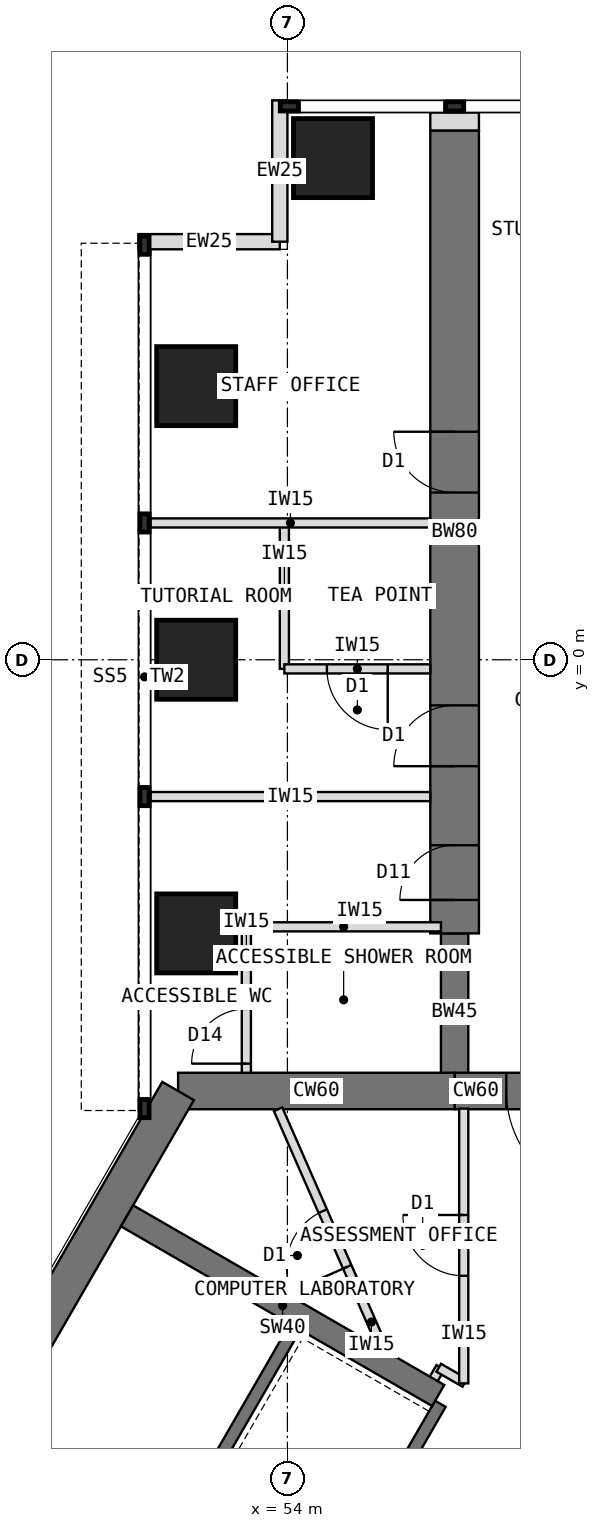
"""IFC4 building model, lengths in metres.
Left out: names, types, materials, properties, quantities, classifications, styles, units other than length and angle.
Written with IfcOpenShell. Run it as: python <this file> out.ifc"""

import sys

from ifc_helpers import new_model, si_unit, direction, frame, frame_2d, origin, origin_2d, place, context, subcontext, project, spatial, rectangle, extrude, element, fill, save


model = new_model("IFC4")
c1 = context("Model", 3, precision=1e-05, world=origin(), true_north=direction((0.0, 1.0)))
c2 = subcontext(c1, "Body", "Model", "MODEL_VIEW")
j1 = project(units=[si_unit("LENGTHUNIT", "METRE"), si_unit("PLANEANGLEUNIT", "RADIAN")], contexts=[c1])
p1 = place(None, origin())
s1 = spatial("IfcSite", under=j1, at=p1, CompositionType="ELEMENT")
p2 = place(p1, origin())
s2 = spatial("IfcBuilding", under=s1, at=p2, CompositionType="ELEMENT")
p3 = place(p2, frame((0.0, 0.0, 125.5)))
s3 = spatial("IfcBuildingStorey", under=s2, at=p3, CompositionType="ELEMENT", Elevation=125.5)
p4 = place(p3, frame((60.25, -7.092, 0.0), z_axis=(0.0, 0.0, 1.0), x_axis=(-1.0, 0.0, 0.0)))
e1 = element("IfcWall", 1, at=p4, inside=s3, PredefinedType="SHEAR", context=c2, shape_type="SweptSolid", body=[
    extrude(rectangle(XDim=3.5, YDim=0.6, at=frame_2d((1.75, 0.0))), origin(), (0.0, 0.0, 1.0), 4.0),
])
p5 = place(p4, frame((0.85, 0.0, 0.0)))
e2 = element("IfcOpeningElement", 2, at=p5, cuts=e1, PredefinedType="OPENING", context=c2, shape_type="SweptSolid", body=[
    extrude(rectangle(XDim=1.8, YDim=2.1, at=frame_2d((0.9, 1.05))), frame((0.0, 0.31, 0.0), z_axis=(0.0, -1.0, 0.0), x_axis=(1.0, 0.0, 0.0)), (0.0, 0.0, 1.0), 0.62),
])
p6 = place(p3, frame((56.75, -7.092, 0.0), z_axis=(0.0, 0.0, 1.0), x_axis=(-1.0, 0.0, 0.0)))
e3 = element("IfcWall", 3, at=p6, inside=s3, PredefinedType="SHEAR", context=c2, shape_type="SweptSolid", body=[
    extrude(rectangle(XDim=4.548, YDim=0.6, at=frame_2d((2.274, 0.0))), origin(), (0.0, 0.0, 1.0), 4.0),
])
p7 = place(p3, frame((52.202, -7.092, 0.0), z_axis=(0.0, 0.0, 1.0), x_axis=(-0.500005998175, -0.866021940709, 0.0)))
e4 = element("IfcWall", 4, at=p7, inside=s3, PredefinedType="SHEAR", context=c2, shape_type="SweptSolid", body=[
    extrude(rectangle(XDim=12.596, YDim=0.6, at=frame_2d((6.298, 0.0))), origin(), (0.0, 0.0, 1.0), 4.0),
])
p8 = place(p3, frame((56.75, -7.092, 0.0), z_axis=(0.0, 0.0, 1.0), x_axis=(0.0, 1.0, 0.0)))
e5 = element("IfcWall", 5, at=p8, inside=s3, PredefinedType="SHEAR", context=c2, shape_type="SweptSolid", body=[
    extrude(rectangle(XDim=2.592, YDim=0.45, at=frame_2d((1.296, 0.0))), origin(), (0.0, 0.0, 1.0), 4.0),
])
p9 = place(p3, frame((56.75, -4.5, 0.0), z_axis=(0.0, 0.0, 1.0), x_axis=(0.0, 1.0, 0.0)))
e6 = element("IfcWall", 6, at=p9, inside=s3, PredefinedType="SHEAR", context=c2, shape_type="SweptSolid", body=[
    extrude(rectangle(XDim=13.2, YDim=0.8, at=frame_2d((6.6, 0.0))), origin(), (0.0, 0.0, 1.0), 4.0),
])
p10 = place(p9, frame((0.55, 0.0, 0.0)))
e7 = element("IfcOpeningElement", 7, at=p10, cuts=e6, PredefinedType="OPENING", context=c2, shape_type="SweptSolid", body=[
    extrude(rectangle(XDim=0.9, YDim=2.1, at=frame_2d((0.45, 1.05))), frame((0.0, 0.41, 0.0), z_axis=(0.0, -1.0, 0.0), x_axis=(1.0, 0.0, 0.0)), (0.0, 0.0, 1.0), 0.82),
])
p11 = place(p9, frame((2.75, 0.0, 0.0)))
e8 = element("IfcOpeningElement", 8, at=p11, cuts=e6, PredefinedType="OPENING", context=c2, shape_type="SweptSolid", body=[
    extrude(rectangle(XDim=1.0, YDim=2.1, at=frame_2d((0.5, 1.05))), frame((0.0, 0.41, 0.0), z_axis=(0.0, -1.0, 0.0), x_axis=(1.0, 0.0, 0.0)), (0.0, 0.0, 1.0), 0.82),
])
p12 = place(p9, frame((7.25, 0.0, 0.0)))
e9 = element("IfcOpeningElement", 9, at=p12, cuts=e6, PredefinedType="OPENING", context=c2, shape_type="SweptSolid", body=[
    extrude(rectangle(XDim=1.0, YDim=2.1, at=frame_2d((0.5, 1.05))), frame((0.0, 0.41, 0.0), z_axis=(0.0, -1.0, 0.0), x_axis=(1.0, 0.0, 0.0)), (0.0, 0.0, 1.0), 0.82),
])
for number, where, z_axis, x_axis in (
    (10, (52.5, -4.5, 0.0), (0.0, 0.0, 1.0), (1.0, 0.0, 0.0)),
    (11, (52.5, 0.0, 0.0), (0.0, 0.0, 1.0), (1.0, 0.0, 0.0)),
    (12, (52.5, 4.5, 0.0), (0.0, 0.0, 1.0), (1.0, 0.0, 0.0)),
    (13, (54.75, 8.25, 0.0), (0.0, 0.0, 1.0), (1.0, 0.0, 0.0)),
):
    element("IfcColumn", number, at=place(p3, frame(where, z_axis=z_axis, x_axis=x_axis)), inside=s3, PredefinedType="COLUMN", context=c2, shape_type="SweptSolid", body=[
        extrude(rectangle(XDim=1.3, YDim=1.3, at=origin_2d()), origin(), (0.0, 0.0, 1.0), 4.0),
    ])
for number, where, z_axis, x_axis in (
    (14, (51.55, 6.875, 0.0), (0.0, 0.0, 1.0), (1.0, 0.0, 0.0)),
    (15, (53.875, 6.875, 0.0), (0.0, 0.0, 1.0), (0.0, 1.0, 0.0)),
):
    element("IfcWall", number, at=place(p3, frame(where, z_axis=z_axis, x_axis=x_axis)), inside=s3, PredefinedType="STANDARD", context=c2, shape_type="SweptSolid", body=[
        extrude(rectangle(XDim=2.325, YDim=0.25, at=frame_2d((1.163, 0.0))), origin(), (0.0, 0.0, 1.0), 3.8),
    ])
p13 = place(p3, frame((56.75, 8.7, 0.0), z_axis=(0.0, 0.0, 1.0), x_axis=(0.0, 1.0, 0.0)))
e16 = element("IfcWall", 16, at=p13, inside=s3, PredefinedType="PARTITIONING", context=c2, shape_type="SweptSolid", body=[
    extrude(rectangle(XDim=0.3, YDim=0.8, at=frame_2d((0.15, 0.0))), origin(), (0.0, 0.0, 1.0), 3.8),
])
p14 = place(p3, frame((56.516, -12.236, 0.0), z_axis=(0.0, 0.0, 1.0), x_axis=(-0.49999894854, -0.866026010844, 0.0)))
e17 = element("IfcWall", 17, at=p14, inside=s3, PredefinedType="SHEAR", context=c2, shape_type="SweptSolid", body=[
    extrude(rectangle(XDim=8.0, YDim=0.2, at=frame_2d((4.0, 0.0))), origin(), (0.0, 0.0, 1.0), 4.0),
])
p15 = place(p14, frame((6.3, 0.0, 0.0)))
e18 = element("IfcOpeningElement", 18, at=p15, cuts=e17, PredefinedType="OPENING", context=c2, shape_type="SweptSolid", body=[
    extrude(rectangle(XDim=1.2, YDim=2.1, at=frame_2d((0.6, 1.05))), frame((0.0, 0.11, 0.0), z_axis=(0.0, -1.0, 0.0), x_axis=(1.0, 0.0, 0.0)), (0.0, 0.0, 1.0), 0.22),
])
p16 = place(p3, frame((54.178, -10.886, 0.0), z_axis=(0.0, 0.0, 1.0), x_axis=(-0.49999894854, -0.866026010844, 0.0)))
e19 = element("IfcWall", 19, at=p16, inside=s3, PredefinedType="SHEAR", context=c2, shape_type="SweptSolid", body=[
    extrude(rectangle(XDim=8.0, YDim=0.2, at=frame_2d((4.0, 0.0))), origin(), (0.0, 0.0, 1.0), 4.0),
])
p17 = place(p16, frame((6.8, 0.0, 0.0)))
e20 = element("IfcOpeningElement", 20, at=p17, cuts=e19, PredefinedType="OPENING", context=c2, shape_type="SweptSolid", body=[
    extrude(rectangle(XDim=0.9, YDim=2.1, at=frame_2d((0.45, 1.05))), frame((0.0, 0.11, 0.0), z_axis=(0.0, -1.0, 0.0), x_axis=(1.0, 0.0, 0.0)), (0.0, 0.0, 1.0), 0.22),
])
p18 = place(p3, frame((56.48, -12.099, 0.0), z_axis=(0.0, 0.0, 1.0), x_axis=(-0.866009424208, 0.500027676417, 0.0)))
e21 = element("IfcWall", 21, at=p18, inside=s3, PredefinedType="SHEAR", context=c2, shape_type="SweptSolid", body=[
    extrude(rectangle(XDim=5.908, YDim=0.4, at=frame_2d((2.954, 0.0))), origin(), (0.0, 0.0, 1.0), 4.0),
])
for number, where, z_axis, x_axis in (
    (22, (56.35, -2.25, 0.0), (0.0, 0.0, 1.0), (-1.0, 0.0, 0.0)),
    (23, (56.35, 2.25, 0.0), (0.0, 0.0, 1.0), (-1.0, 0.0, 0.0)),
):
    element("IfcWall", number, at=place(p3, frame(where, z_axis=z_axis, x_axis=x_axis)), inside=s3, PredefinedType="PARTITIONING", context=c2, shape_type="SweptSolid", body=[
        extrude(rectangle(XDim=4.6, YDim=0.15, at=frame_2d((2.3, 0.0))), origin(), (0.0, 0.0, 1.0), 3.8),
    ])
p19 = place(p3, frame((53.95, -0.15, 0.0), z_axis=(0.0, 0.0, 1.0), x_axis=(0.0, 1.0, 0.0)))
e24 = element("IfcWall", 24, at=p19, inside=s3, PredefinedType="PARTITIONING", context=c2, shape_type="SweptSolid", body=[
    extrude(rectangle(XDim=2.4, YDim=0.15, at=frame_2d((1.2, 0.0))), origin(), (0.0, 0.0, 1.0), 3.8),
])
p20 = place(p3, frame((56.35, -0.15, 0.0), z_axis=(0.0, 0.0, 1.0), x_axis=(-1.0, 0.0, 0.0)))
e25 = element("IfcWall", 25, at=p20, inside=s3, PredefinedType="PARTITIONING", context=c2, shape_type="SweptSolid", body=[
    extrude(rectangle(XDim=2.4, YDim=0.15, at=frame_2d((1.2, 0.0))), origin(), (0.0, 0.0, 1.0), 3.8),
])
p21 = place(p20, frame((0.7, 0.0, 0.0)))
e26 = element("IfcOpeningElement", 26, at=p21, cuts=e25, PredefinedType="OPENING", context=c2, shape_type="SweptSolid", body=[
    extrude(rectangle(XDim=1.0, YDim=2.1, at=frame_2d((0.5, 1.05))), frame((0.0, 0.085, 0.0), z_axis=(0.0, -1.0, 0.0), x_axis=(1.0, 0.0, 0.0)), (0.0, 0.0, 1.0), 0.17),
])
p22 = place(p3, frame((53.325, -6.792, 0.0), z_axis=(0.0, 0.0, 1.0), x_axis=(0.0, 1.0, 0.0)))
e27 = element("IfcWall", 27, at=p22, inside=s3, PredefinedType="PARTITIONING", context=c2, shape_type="SweptSolid", body=[
    extrude(rectangle(XDim=2.4, YDim=0.15, at=frame_2d((1.2, 0.0))), origin(), (0.0, 0.0, 1.0), 3.8),
])
p23 = place(p22, frame((0.15, 0.0, 0.0)))
e28 = element("IfcOpeningElement", 28, at=p23, cuts=e27, PredefinedType="OPENING", context=c2, shape_type="SweptSolid", body=[
    extrude(rectangle(XDim=0.9, YDim=2.1, at=frame_2d((0.45, 1.05))), frame((0.0, 0.085, 0.0), z_axis=(0.0, -1.0, 0.0), x_axis=(1.0, 0.0, 0.0)), (0.0, 0.0, 1.0), 0.17),
])
p24 = place(p3, frame((56.525, -4.392, 0.0), z_axis=(0.0, 0.0, 1.0), x_axis=(-1.0, 0.0, 0.0)))
e29 = element("IfcWall", 29, at=p24, inside=s3, PredefinedType="PARTITIONING", context=c2, shape_type="SweptSolid", body=[
    extrude(rectangle(XDim=3.2, YDim=0.15, at=frame_2d((1.6, 0.0))), origin(), (0.0, 0.0, 1.0), 3.8),
])
p25 = place(p3, frame((56.302, -12.008, 0.0), z_axis=(0.0, 0.0, 1.0), x_axis=(0.500230298122, 0.865892400268, 0.0)))
e30 = element("IfcWall", 30, at=p25, inside=s3, PredefinedType="PARTITIONING", context=c2, shape_type="SweptSolid", body=[
    extrude(rectangle(XDim=0.43, YDim=0.15, at=frame_2d((0.215, 0.0))), origin(), (0.0, 0.0, 1.0), 3.8),
])
p26 = place(p3, frame((56.489, -11.643, 0.0), z_axis=(0.0, 0.0, 1.0), x_axis=(0.865831790172, -0.50033519877, 0.0)))
e31 = element("IfcWall", 31, at=p26, inside=s3, PredefinedType="PARTITIONING", context=c2, shape_type="SweptSolid", body=[
    extrude(rectangle(XDim=0.494, YDim=0.15, at=frame_2d((0.247, 0.0))), origin(), (0.0, 0.0, 1.0), 3.8),
])
p27 = place(p3, frame((56.9, -11.9, 0.0), z_axis=(0.0, 0.0, 1.0), x_axis=(0.0, 1.0, 0.0)))
e32 = element("IfcWall", 32, at=p27, inside=s3, PredefinedType="PARTITIONING", context=c2, shape_type="SweptSolid", body=[
    extrude(rectangle(XDim=4.519, YDim=0.15, at=frame_2d((2.259, 0.0))), origin(), (0.0, 0.0, 1.0), 3.8),
])
p28 = place(p27, frame((1.769, 0.0, 0.0)))
e33 = element("IfcOpeningElement", 33, at=p28, cuts=e32, PredefinedType="OPENING", context=c2, shape_type="SweptSolid", body=[
    extrude(rectangle(XDim=1.0, YDim=2.1, at=frame_2d((0.5, 1.05))), frame((0.0, 0.085, 0.0), z_axis=(0.0, -1.0, 0.0), x_axis=(1.0, 0.0, 0.0)), (0.0, 0.0, 1.0), 0.17),
])
p29 = place(p3, frame((55.719, -11.66, 0.0), z_axis=(0.0, 0.0, 1.0), x_axis=(-0.401686926791, 0.915777054116, 0.0)))
e34 = element("IfcWall", 34, at=p29, inside=s3, PredefinedType="PARTITIONING", context=c2, shape_type="SweptSolid", body=[
    extrude(rectangle(XDim=4.661, YDim=0.15, at=frame_2d((2.331, 0.0))), origin(), (0.0, 0.0, 1.0), 3.8),
])
p30 = place(p29, frame((1.831, 0.0, 0.0)))
e35 = element("IfcOpeningElement", 35, at=p30, cuts=e34, PredefinedType="OPENING", context=c2, shape_type="SweptSolid", body=[
    extrude(rectangle(XDim=1.0, YDim=2.1, at=frame_2d((0.5, 1.05))), frame((0.0, 0.085, 0.0), z_axis=(0.0, -1.0, 0.0), x_axis=(1.0, 0.0, 0.0)), (0.0, 0.0, 1.0), 0.17),
])
p31 = place(p5, origin())
e36 = element("IfcDoor", 36, at=p31, inside=s3, OperationType="DOUBLE_DOOR_DOUBLE_SWING", PredefinedType="DOOR", context=c2, shape_type="SweptSolid", body=[
    extrude(rectangle(XDim=1.72, YDim=2.06, at=frame_2d((0.9, 1.03))), frame((0.0, 0.025, 0.0), z_axis=(0.0, -1.0, 0.0), x_axis=(1.0, 0.0, 0.0)), (0.0, 0.0, 1.0), 0.05),
    extrude(rectangle(XDim=0.04, YDim=2.1, at=frame_2d((0.02, 1.05))), frame((0.0, 0.3, 0.0), z_axis=(0.0, -1.0, 0.0), x_axis=(1.0, 0.0, 0.0)), (0.0, 0.0, 1.0), 0.6),
    extrude(rectangle(XDim=0.04, YDim=2.1, at=frame_2d((1.78, 1.05))), frame((0.0, 0.3, 0.0), z_axis=(0.0, -1.0, 0.0), x_axis=(1.0, 0.0, 0.0)), (0.0, 0.0, 1.0), 0.6),
    extrude(rectangle(XDim=1.72, YDim=0.04, at=frame_2d((0.9, 2.08))), frame((0.0, 0.3, 0.0), z_axis=(0.0, -1.0, 0.0), x_axis=(1.0, 0.0, 0.0)), (0.0, 0.0, 1.0), 0.6),
])
fill(e2, e36)
p32 = place(p21, origin())
e37 = element("IfcDoor", 37, at=p32, inside=s3, OperationType="SINGLE_SWING_LEFT", PredefinedType="DOOR", context=c2, shape_type="SweptSolid", body=[
    extrude(rectangle(XDim=1.0, YDim=2.1, at=frame_2d((0.5, 1.05))), frame((0.0, 0.025, 0.0), z_axis=(0.0, -1.0, 0.0), x_axis=(1.0, 0.0, 0.0)), (0.0, 0.0, 1.0), 0.05),
])
fill(e26, e37)
p33 = place(p23, origin())
e38 = element("IfcDoor", 38, at=p33, inside=s3, OperationType="SINGLE_SWING_LEFT", PredefinedType="DOOR", context=c2, shape_type="SweptSolid", body=[
    extrude(rectangle(XDim=0.9, YDim=2.1, at=frame_2d((0.45, 1.05))), frame((0.0, 0.025, 0.0), z_axis=(0.0, -1.0, 0.0), x_axis=(1.0, 0.0, 0.0)), (0.0, 0.0, 1.0), 0.05),
])
fill(e28, e38)
p34 = place(p30, origin())
e39 = element("IfcDoor", 39, at=p34, inside=s3, OperationType="SINGLE_SWING_LEFT", PredefinedType="DOOR", context=c2, shape_type="SweptSolid", body=[
    extrude(rectangle(XDim=1.0, YDim=2.1, at=frame_2d((0.5, 1.05))), frame((0.0, 0.025, 0.0), z_axis=(0.0, -1.0, 0.0), x_axis=(1.0, 0.0, 0.0)), (0.0, 0.0, 1.0), 0.05),
])
fill(e35, e39)
p35 = place(p28, origin())
e40 = element("IfcDoor", 40, at=p35, inside=s3, OperationType="SINGLE_SWING_RIGHT", PredefinedType="DOOR", context=c2, shape_type="SweptSolid", body=[
    extrude(rectangle(XDim=1.0, YDim=2.1, at=frame_2d((0.5, 1.05))), frame((0.0, 0.025, 0.0), z_axis=(0.0, -1.0, 0.0), x_axis=(1.0, 0.0, 0.0)), (0.0, 0.0, 1.0), 0.05),
])
fill(e33, e40)
p36 = place(p10, origin())
e41 = element("IfcDoor", 41, at=p36, inside=s3, OperationType="SINGLE_SWING_LEFT", PredefinedType="DOOR", context=c2, shape_type="SweptSolid", body=[
    extrude(rectangle(XDim=0.82, YDim=2.06, at=frame_2d((0.45, 1.03))), frame((0.0, 0.025, 0.0), z_axis=(0.0, -1.0, 0.0), x_axis=(1.0, 0.0, 0.0)), (0.0, 0.0, 1.0), 0.05),
    extrude(rectangle(XDim=0.04, YDim=2.1, at=frame_2d((0.02, 1.05))), frame((0.0, 0.4, 0.0), z_axis=(0.0, -1.0, 0.0), x_axis=(1.0, 0.0, 0.0)), (0.0, 0.0, 1.0), 0.8),
    extrude(rectangle(XDim=0.04, YDim=2.1, at=frame_2d((0.88, 1.05))), frame((0.0, 0.4, 0.0), z_axis=(0.0, -1.0, 0.0), x_axis=(1.0, 0.0, 0.0)), (0.0, 0.0, 1.0), 0.8),
    extrude(rectangle(XDim=0.82, YDim=0.04, at=frame_2d((0.45, 2.08))), frame((0.0, 0.4, 0.0), z_axis=(0.0, -1.0, 0.0), x_axis=(1.0, 0.0, 0.0)), (0.0, 0.0, 1.0), 0.8),
])
fill(e7, e41)
p37 = place(p11, origin())
e42 = element("IfcDoor", 42, at=p37, inside=s3, OperationType="SINGLE_SWING_LEFT", PredefinedType="DOOR", context=c2, shape_type="SweptSolid", body=[
    extrude(rectangle(XDim=0.92, YDim=2.06, at=frame_2d((0.5, 1.03))), frame((0.0, 0.025, 0.0), z_axis=(0.0, -1.0, 0.0), x_axis=(1.0, 0.0, 0.0)), (0.0, 0.0, 1.0), 0.05),
    extrude(rectangle(XDim=0.04, YDim=2.1, at=frame_2d((0.02, 1.05))), frame((0.0, 0.4, 0.0), z_axis=(0.0, -1.0, 0.0), x_axis=(1.0, 0.0, 0.0)), (0.0, 0.0, 1.0), 0.8),
    extrude(rectangle(XDim=0.04, YDim=2.1, at=frame_2d((0.98, 1.05))), frame((0.0, 0.4, 0.0), z_axis=(0.0, -1.0, 0.0), x_axis=(1.0, 0.0, 0.0)), (0.0, 0.0, 1.0), 0.8),
    extrude(rectangle(XDim=0.92, YDim=0.04, at=frame_2d((0.5, 2.08))), frame((0.0, 0.4, 0.0), z_axis=(0.0, -1.0, 0.0), x_axis=(1.0, 0.0, 0.0)), (0.0, 0.0, 1.0), 0.8),
])
fill(e8, e42)
p38 = place(p12, origin())
e43 = element("IfcDoor", 43, at=p38, inside=s3, OperationType="SINGLE_SWING_RIGHT", PredefinedType="DOOR", context=c2, shape_type="SweptSolid", body=[
    extrude(rectangle(XDim=0.92, YDim=2.06, at=frame_2d((0.5, 1.03))), frame((0.0, 0.025, 0.0), z_axis=(0.0, -1.0, 0.0), x_axis=(1.0, 0.0, 0.0)), (0.0, 0.0, 1.0), 0.05),
    extrude(rectangle(XDim=0.04, YDim=2.1, at=frame_2d((0.02, 1.05))), frame((0.0, 0.4, 0.0), z_axis=(0.0, -1.0, 0.0), x_axis=(1.0, 0.0, 0.0)), (0.0, 0.0, 1.0), 0.8),
    extrude(rectangle(XDim=0.04, YDim=2.1, at=frame_2d((0.98, 1.05))), frame((0.0, 0.4, 0.0), z_axis=(0.0, -1.0, 0.0), x_axis=(1.0, 0.0, 0.0)), (0.0, 0.0, 1.0), 0.8),
    extrude(rectangle(XDim=0.92, YDim=0.04, at=frame_2d((0.5, 2.08))), frame((0.0, 0.4, 0.0), z_axis=(0.0, -1.0, 0.0), x_axis=(1.0, 0.0, 0.0)), (0.0, 0.0, 1.0), 0.8),
])
fill(e9, e43)
save(model, sys.argv[1])
